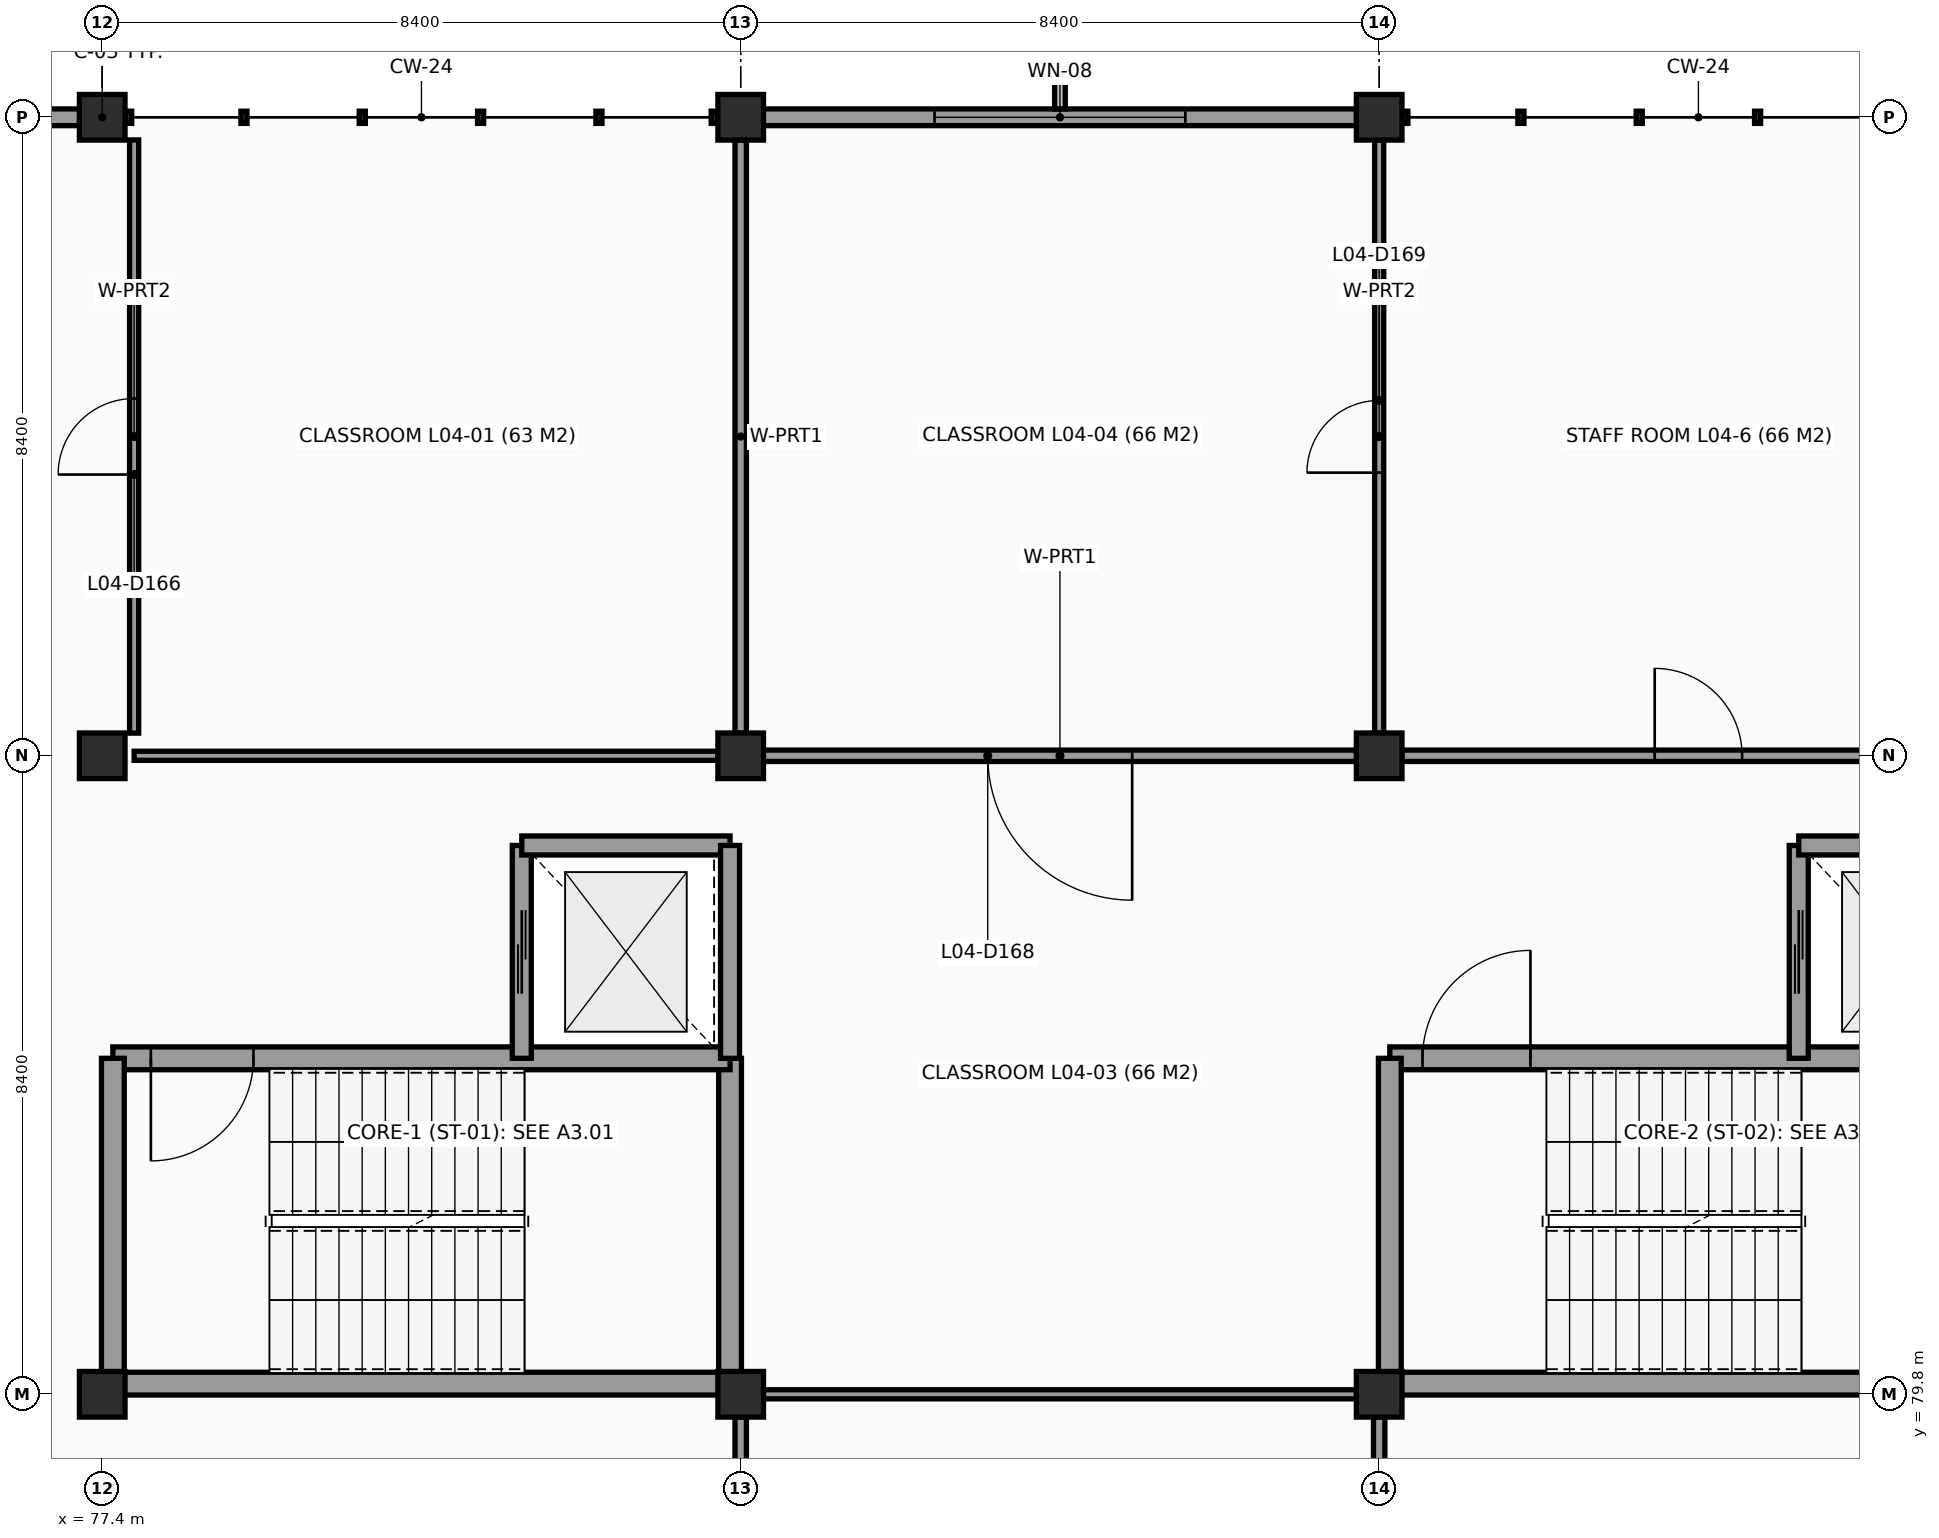
"""IFC4 building model, lengths in metres.
Left out: names, types, materials, properties, quantities, classifications, styles, units other than length and angle.
Written with IfcOpenShell. Run it as: python <this file> out.ifc"""

import sys

from ifc_helpers import new_model, si_unit, direction, frame, frame_2d, origin, origin_2d, place, context, subcontext, project, spatial, rectangle, extrude, element, fill, save


model = new_model("IFC4")
c1 = context("Model", 3, precision=1e-05, world=origin(), true_north=direction((0.0, 1.0)))
c2 = subcontext(c1, "Body", "Model", "MODEL_VIEW")
j1 = project(units=[si_unit("LENGTHUNIT", "METRE"), si_unit("PLANEANGLEUNIT", "RADIAN")], contexts=[c1])
p1 = place(None, origin())
s1 = spatial("IfcSite", under=j1, at=p1, CompositionType="ELEMENT")
p2 = place(p1, origin())
s2 = spatial("IfcBuilding", under=s1, at=p2, CompositionType="ELEMENT")
p3 = place(p2, frame((0.0, 0.0, 15.0)))
s3 = spatial("IfcBuildingStorey", under=s2, at=p3, CompositionType="ELEMENT", Elevation=15.0)
for number, where, z_axis, x_axis in (
    (1, (77.4, 79.8, 0.0), (0.0, 0.0, 1.0), (1.0, 0.0, 0.0)),
    (2, (77.4, 88.2, 0.0), (0.0, 0.0, 1.0), (1.0, 0.0, 0.0)),
    (3, (77.4, 96.6, 0.0), (0.0, 0.0, 1.0), (1.0, 0.0, 0.0)),
    (4, (85.8, 79.8, 0.0), (0.0, 0.0, 1.0), (1.0, 0.0, 0.0)),
    (5, (85.8, 88.2, 0.0), (0.0, 0.0, 1.0), (1.0, 0.0, 0.0)),
    (6, (85.8, 96.6, 0.0), (0.0, 0.0, 1.0), (1.0, 0.0, 0.0)),
    (7, (94.2, 79.8, 0.0), (0.0, 0.0, 1.0), (1.0, 0.0, 0.0)),
    (8, (94.2, 88.2, 0.0), (0.0, 0.0, 1.0), (1.0, 0.0, 0.0)),
    (9, (94.2, 96.6, 0.0), (0.0, 0.0, 1.0), (1.0, 0.0, 0.0)),
):
    element("IfcColumn", number, at=place(p3, frame(where, z_axis=z_axis, x_axis=x_axis)), inside=s3, PredefinedType="COLUMN", context=c2, shape_type="SweptSolid", body=[
        extrude(rectangle(XDim=0.6, YDim=0.6, at=origin_2d()), origin(), (0.0, 0.0, 1.0), 3.6),
    ])
p4 = place(p3, frame((74.623, 96.6, 0.0), z_axis=(0.0, 0.0, 1.0), x_axis=(1.0, 0.0, 0.0)))
e10 = element("IfcWall", 10, at=p4, inside=s3, PredefinedType="SOLIDWALL", context=c2, shape_type="SweptSolid", body=[
    extrude(rectangle(XDim=2.479, YDim=0.22, at=frame_2d((1.24, 0.0))), origin(), (0.0, 0.0, 1.0), 2.58),
])
p5 = place(p3, frame((86.098, 96.6, 0.0), z_axis=(0.0, 0.0, 1.0), x_axis=(1.0, 0.0, 0.0)))
e11 = element("IfcWall", 11, at=p5, inside=s3, PredefinedType="SOLIDWALL", context=c2, shape_type="SweptSolid", body=[
    extrude(rectangle(XDim=7.804, YDim=0.22, at=frame_2d((3.902, 0.0))), origin(), (0.0, 0.0, 1.0), 2.65),
])
p6 = place(p5, frame((2.252, 0.0, 0.95)))
e12 = element("IfcOpeningElement", 12, at=p6, cuts=e11, PredefinedType="OPENING", context=c2, shape_type="SweptSolid", body=[
    extrude(rectangle(XDim=3.3, YDim=1.2, at=frame_2d((1.65, 0.6))), frame((0.0, 0.12, 0.0), z_axis=(0.0, -1.0, 0.0), x_axis=(1.0, 0.0, 0.0)), (0.0, 0.0, 1.0), 0.24),
])
p7 = place(p3, frame((77.54, 79.94, 0.0), z_axis=(0.0, 0.0, 1.0), x_axis=(1.0, 0.0, 0.0)))
e13 = element("IfcWall", 13, at=p7, inside=s3, PredefinedType="SHEAR", context=c2, shape_type="SweptSolid", body=[
    extrude(rectangle(XDim=8.12, YDim=0.3, at=frame_2d((4.06, 0.0))), origin(), (0.0, 0.0, 1.0), 3.6),
])
p8 = place(p3, frame((85.66, 79.94, 0.0), z_axis=(0.0, 0.0, 1.0), x_axis=(0.0, 1.0, 0.0)))
e14 = element("IfcWall", 14, at=p8, inside=s3, PredefinedType="SHEAR", context=c2, shape_type="SweptSolid", body=[
    extrude(rectangle(XDim=4.28, YDim=0.3, at=frame_2d((2.14, 0.0))), origin(), (0.0, 0.0, 1.0), 3.6),
])
p9 = place(p3, frame((85.66, 84.22, 0.0), z_axis=(0.0, 0.0, 1.0), x_axis=(-1.0, 0.0, 0.0)))
e15 = element("IfcWall", 15, at=p9, inside=s3, PredefinedType="SHEAR", context=c2, shape_type="SweptSolid", body=[
    extrude(rectangle(XDim=8.12, YDim=0.3, at=frame_2d((4.06, 0.0))), origin(), (0.0, 0.0, 1.0), 3.6),
])
p10 = place(p9, frame((6.27, 0.0, 0.0)))
e16 = element("IfcOpeningElement", 16, at=p10, cuts=e15, PredefinedType="OPENING", context=c2, shape_type="SweptSolid", body=[
    extrude(rectangle(XDim=1.35, YDim=2.15, at=frame_2d((0.675, 1.075))), frame((0.0, 0.16, 0.0), z_axis=(0.0, -1.0, 0.0), x_axis=(1.0, 0.0, 0.0)), (0.0, 0.0, 1.0), 0.32),
])
p11 = place(p3, frame((77.54, 84.22, 0.0), z_axis=(0.0, 0.0, 1.0), x_axis=(0.0, -1.0, 0.0)))
e17 = element("IfcWall", 17, at=p11, inside=s3, PredefinedType="SHEAR", context=c2, shape_type="SweptSolid", body=[
    extrude(rectangle(XDim=4.28, YDim=0.3, at=frame_2d((2.14, 0.0))), origin(), (0.0, 0.0, 1.0), 3.6),
])
p12 = place(p3, frame((82.92, 87.02, 0.0), z_axis=(0.0, 0.0, 1.0), x_axis=(0.0, -1.0, 0.0)))
e18 = element("IfcWall", 18, at=p12, inside=s3, PredefinedType="SHEAR", context=c2, shape_type="SweptSolid", body=[
    extrude(rectangle(XDim=2.8, YDim=0.25, at=frame_2d((1.4, 0.0))), origin(), (0.0, 0.0, 1.0), 3.6),
])
p13 = place(p12, frame((0.85, 0.0, 0.0)))
e19 = element("IfcOpeningElement", 19, at=p13, cuts=e18, PredefinedType="OPENING", context=c2, shape_type="SweptSolid", body=[
    extrude(rectangle(XDim=1.1, YDim=2.15, at=frame_2d((0.55, 1.075))), frame((0.0, 0.135, 0.0), z_axis=(0.0, -1.0, 0.0), x_axis=(1.0, 0.0, 0.0)), (0.0, 0.0, 1.0), 0.27),
])
p14 = place(p3, frame((85.66, 87.02, 0.0), z_axis=(0.0, 0.0, 1.0), x_axis=(-1.0, 0.0, 0.0)))
e20 = element("IfcWall", 20, at=p14, inside=s3, PredefinedType="SHEAR", context=c2, shape_type="SweptSolid", body=[
    extrude(rectangle(XDim=2.74, YDim=0.25, at=frame_2d((1.37, 0.0))), origin(), (0.0, 0.0, 1.0), 3.6),
])
p15 = place(p3, frame((85.66, 84.22, 0.0), z_axis=(0.0, 0.0, 1.0), x_axis=(0.0, 1.0, 0.0)))
e21 = element("IfcWall", 21, at=p15, inside=s3, PredefinedType="SHEAR", context=c2, shape_type="SweptSolid", body=[
    extrude(rectangle(XDim=2.8, YDim=0.25, at=frame_2d((1.4, 0.0))), origin(), (0.0, 0.0, 1.0), 3.6),
])
p16 = place(p3, frame((94.34, 79.94, 0.0), z_axis=(0.0, 0.0, 1.0), x_axis=(1.0, 0.0, 0.0)))
e22 = element("IfcWall", 22, at=p16, inside=s3, PredefinedType="SHEAR", context=c2, shape_type="SweptSolid", body=[
    extrude(rectangle(XDim=8.12, YDim=0.3, at=frame_2d((4.06, 0.0))), origin(), (0.0, 0.0, 1.0), 3.6),
])
p17 = place(p3, frame((102.46, 84.22, 0.0), z_axis=(0.0, 0.0, 1.0), x_axis=(-1.0, 0.0, 0.0)))
e23 = element("IfcWall", 23, at=p17, inside=s3, PredefinedType="SHEAR", context=c2, shape_type="SweptSolid", body=[
    extrude(rectangle(XDim=8.12, YDim=0.3, at=frame_2d((4.06, 0.0))), origin(), (0.0, 0.0, 1.0), 3.6),
])
p18 = place(p17, frame((6.27, 0.0, 0.0)))
e24 = element("IfcOpeningElement", 24, at=p18, cuts=e23, PredefinedType="OPENING", context=c2, shape_type="SweptSolid", body=[
    extrude(rectangle(XDim=1.42, YDim=2.15, at=frame_2d((0.71, 1.075))), frame((0.0, 0.16, 0.0), z_axis=(0.0, -1.0, 0.0), x_axis=(1.0, 0.0, 0.0)), (0.0, 0.0, 1.0), 0.32),
])
p19 = place(p3, frame((94.34, 84.22, 0.0), z_axis=(0.0, 0.0, 1.0), x_axis=(0.0, -1.0, 0.0)))
e25 = element("IfcWall", 25, at=p19, inside=s3, PredefinedType="SHEAR", context=c2, shape_type="SweptSolid", body=[
    extrude(rectangle(XDim=4.28, YDim=0.3, at=frame_2d((2.14, 0.0))), origin(), (0.0, 0.0, 1.0), 3.6),
])
p20 = place(p3, frame((99.72, 87.02, 0.0), z_axis=(0.0, 0.0, 1.0), x_axis=(0.0, -1.0, 0.0)))
e26 = element("IfcWall", 26, at=p20, inside=s3, PredefinedType="SHEAR", context=c2, shape_type="SweptSolid", body=[
    extrude(rectangle(XDim=2.8, YDim=0.25, at=frame_2d((1.4, 0.0))), origin(), (0.0, 0.0, 1.0), 3.6),
])
p21 = place(p20, frame((0.85, 0.0, 0.0)))
e27 = element("IfcOpeningElement", 27, at=p21, cuts=e26, PredefinedType="OPENING", context=c2, shape_type="SweptSolid", body=[
    extrude(rectangle(XDim=1.1, YDim=2.15, at=frame_2d((0.55, 1.075))), frame((0.0, 0.135, 0.0), z_axis=(0.0, -1.0, 0.0), x_axis=(1.0, 0.0, 0.0)), (0.0, 0.0, 1.0), 0.27),
])
p22 = place(p3, frame((102.46, 87.02, 0.0), z_axis=(0.0, 0.0, 1.0), x_axis=(-1.0, 0.0, 0.0)))
e28 = element("IfcWall", 28, at=p22, inside=s3, PredefinedType="SHEAR", context=c2, shape_type="SweptSolid", body=[
    extrude(rectangle(XDim=2.74, YDim=0.25, at=frame_2d((1.37, 0.0))), origin(), (0.0, 0.0, 1.0), 3.6),
])
p23 = place(p3, frame((77.82, 88.498, 0.0), z_axis=(0.0, 0.0, 1.0), x_axis=(0.0, 1.0, 0.0)))
e29 = element("IfcWall", 29, at=p23, inside=s3, PredefinedType="PARTITIONING", context=c2, shape_type="SweptSolid", body=[
    extrude(rectangle(XDim=7.804, YDim=0.12, at=frame_2d((3.902, 0.0))), origin(), (0.0, 0.0, 1.0), 3.05),
])
p24 = place(p23, frame((3.402, 0.0, 0.0)))
e30 = element("IfcOpeningElement", 30, at=p24, cuts=e29, PredefinedType="OPENING", context=c2, shape_type="SweptSolid", body=[
    extrude(rectangle(XDim=1.0, YDim=2.1, at=frame_2d((0.5, 1.05))), frame((0.0, 0.07, 0.0), z_axis=(0.0, -1.0, 0.0), x_axis=(1.0, 0.0, 0.0)), (0.0, 0.0, 1.0), 0.14),
])
p25 = place(p3, frame((85.8, 96.302, 0.0), z_axis=(0.0, 0.0, 1.0), x_axis=(0.0, -1.0, 0.0)))
e31 = element("IfcWall", 31, at=p25, inside=s3, PredefinedType="PARTITIONING", context=c2, shape_type="SweptSolid", body=[
    extrude(rectangle(XDim=7.804, YDim=0.15, at=frame_2d((3.902, 0.0))), origin(), (0.0, 0.0, 1.0), 2.75),
])
p26 = place(p3, frame((85.502, 88.2, 0.0), z_axis=(0.0, 0.0, 1.0), x_axis=(-1.0, 0.0, 0.0)))
e32 = element("IfcWall", 32, at=p26, inside=s3, PredefinedType="PARTITIONING", context=c2, shape_type="SweptSolid", body=[
    extrude(rectangle(XDim=7.682, YDim=0.12, at=frame_2d((3.841, 0.0))), origin(), (0.0, 0.0, 1.0), 2.48),
])
p27 = place(p3, frame((85.8, 73.8, 0.0), z_axis=(0.0, 0.0, 1.0), x_axis=(0.0, 1.0, 0.0)))
e33 = element("IfcWall", 33, at=p27, inside=s3, PredefinedType="PARTITIONING", context=c2, shape_type="SweptSolid", body=[
    extrude(rectangle(XDim=5.702, YDim=0.15, at=frame_2d((2.851, 0.0))), origin(), (0.0, 0.0, 1.0), 2.68),
])
p28 = place(p27, frame((1.951, 0.0, 0.0)))
e34 = element("IfcOpeningElement", 34, at=p28, cuts=e33, PredefinedType="OPENING", context=c2, shape_type="SweptSolid", body=[
    extrude(rectangle(XDim=1.8, YDim=2.25, at=frame_2d((0.9, 1.125))), frame((0.0, 0.085, 0.0), z_axis=(0.0, -1.0, 0.0), x_axis=(1.0, 0.0, 0.0)), (0.0, 0.0, 1.0), 0.17),
])
p29 = place(p3, frame((86.098, 79.8, 0.0), z_axis=(0.0, 0.0, 1.0), x_axis=(1.0, 0.0, 0.0)))
e35 = element("IfcWall", 35, at=p29, inside=s3, PredefinedType="PARTITIONING", context=c2, shape_type="SweptSolid", body=[
    extrude(rectangle(XDim=7.804, YDim=0.12, at=frame_2d((3.902, 0.0))), origin(), (0.0, 0.0, 1.0), 2.7),
])
p30 = place(p3, frame((94.2, 79.502, 0.0), z_axis=(0.0, 0.0, 1.0), x_axis=(0.0, -1.0, 0.0)))
e36 = element("IfcWall", 36, at=p30, inside=s3, PredefinedType="PARTITIONING", context=c2, shape_type="SweptSolid", body=[
    extrude(rectangle(XDim=5.702, YDim=0.15, at=frame_2d((2.851, 0.0))), origin(), (0.0, 0.0, 1.0), 2.95),
])
p31 = place(p3, frame((86.098, 88.2, 0.0), z_axis=(0.0, 0.0, 1.0), x_axis=(1.0, 0.0, 0.0)))
e37 = element("IfcWall", 37, at=p31, inside=s3, PredefinedType="PARTITIONING", context=c2, shape_type="SweptSolid", body=[
    extrude(rectangle(XDim=7.804, YDim=0.15, at=frame_2d((3.902, 0.0))), origin(), (0.0, 0.0, 1.0), 2.55),
])
p32 = place(p31, frame((2.952, 0.0, 0.0)))
e38 = element("IfcOpeningElement", 38, at=p32, cuts=e37, PredefinedType="OPENING", context=c2, shape_type="SweptSolid", body=[
    extrude(rectangle(XDim=1.9, YDim=2.3, at=frame_2d((0.95, 1.15))), frame((0.0, 0.085, 0.0), z_axis=(0.0, -1.0, 0.0), x_axis=(1.0, 0.0, 0.0)), (0.0, 0.0, 1.0), 0.17),
])
p33 = place(p3, frame((94.2, 96.302, 0.0), z_axis=(0.0, 0.0, 1.0), x_axis=(0.0, -1.0, 0.0)))
e39 = element("IfcWall", 39, at=p33, inside=s3, PredefinedType="PARTITIONING", context=c2, shape_type="SweptSolid", body=[
    extrude(rectangle(XDim=7.804, YDim=0.12, at=frame_2d((3.902, 0.0))), origin(), (0.0, 0.0, 1.0), 2.95),
])
p34 = place(p33, frame((3.427, 0.0, 0.0)))
e40 = element("IfcOpeningElement", 40, at=p34, cuts=e39, PredefinedType="OPENING", context=c2, shape_type="SweptSolid", body=[
    extrude(rectangle(XDim=0.95, YDim=2.1, at=frame_2d((0.475, 1.05))), frame((0.0, 0.07, 0.0), z_axis=(0.0, -1.0, 0.0), x_axis=(1.0, 0.0, 0.0)), (0.0, 0.0, 1.0), 0.14),
])
p35 = place(p3, frame((102.302, 88.2, 0.0), z_axis=(0.0, 0.0, 1.0), x_axis=(-1.0, 0.0, 0.0)))
e41 = element("IfcWall", 41, at=p35, inside=s3, PredefinedType="PARTITIONING", context=c2, shape_type="SweptSolid", body=[
    extrude(rectangle(XDim=7.804, YDim=0.15, at=frame_2d((3.902, 0.0))), origin(), (0.0, 0.0, 1.0), 2.55),
])
p36 = place(p35, frame((3.327, 0.0, 0.0)))
e42 = element("IfcOpeningElement", 42, at=p36, cuts=e41, PredefinedType="OPENING", context=c2, shape_type="SweptSolid", body=[
    extrude(rectangle(XDim=1.15, YDim=2.15, at=frame_2d((0.575, 1.075))), frame((0.0, 0.085, 0.0), z_axis=(0.0, -1.0, 0.0), x_axis=(1.0, 0.0, 0.0)), (0.0, 0.0, 1.0), 0.17),
])
p37 = place(p6, origin())
e43 = element("IfcWindow", 43, at=p37, inside=s3, PartitioningType="SINGLE_PANEL", PredefinedType="WINDOW", context=c2, shape_type="SweptSolid", body=[
    extrude(rectangle(XDim=3.3, YDim=1.2, at=frame_2d((1.65, 0.6))), frame((0.0, 0.03, 0.0), z_axis=(0.0, -1.0, 0.0), x_axis=(1.0, 0.0, 0.0)), (0.0, 0.0, 1.0), 0.06),
])
fill(e12, e43)
p38 = place(p10, frame((1.35, 0.0, 0.0), z_axis=(0.0, 0.0, 1.0), x_axis=(-1.0, 0.0, 0.0)))
e44 = element("IfcDoor", 44, at=p38, inside=s3, OperationType="SINGLE_SWING_RIGHT", PredefinedType="DOOR", context=c2, shape_type="SweptSolid", body=[
    extrude(rectangle(XDim=1.35, YDim=2.15, at=frame_2d((0.675, 1.075))), frame((0.0, 0.025, 0.0), z_axis=(0.0, -1.0, 0.0), x_axis=(1.0, 0.0, 0.0)), (0.0, 0.0, 1.0), 0.05),
])
fill(e16, e44)
p39 = place(p13, origin())
e45 = element("IfcDoor", 45, at=p39, inside=s3, OperationType="DOUBLE_DOOR_SLIDING", PredefinedType="DOOR", context=c2, shape_type="SweptSolid", body=[
    extrude(rectangle(XDim=1.1, YDim=2.15, at=frame_2d((0.55, 1.075))), frame((0.0, 0.025, 0.0), z_axis=(0.0, -1.0, 0.0), x_axis=(1.0, 0.0, 0.0)), (0.0, 0.0, 1.0), 0.05),
])
fill(e19, e45)
p40 = place(p18, frame((1.42, 0.0, 0.0), z_axis=(0.0, 0.0, 1.0), x_axis=(-1.0, 0.0, 0.0)))
e46 = element("IfcDoor", 46, at=p40, inside=s3, OperationType="SINGLE_SWING_LEFT", PredefinedType="DOOR", context=c2, shape_type="SweptSolid", body=[
    extrude(rectangle(XDim=1.42, YDim=2.15, at=frame_2d((0.71, 1.075))), frame((0.0, 0.025, 0.0), z_axis=(0.0, -1.0, 0.0), x_axis=(1.0, 0.0, 0.0)), (0.0, 0.0, 1.0), 0.05),
])
fill(e24, e46)
p41 = place(p21, origin())
e47 = element("IfcDoor", 47, at=p41, inside=s3, OperationType="DOUBLE_DOOR_SLIDING", PredefinedType="DOOR", context=c2, shape_type="SweptSolid", body=[
    extrude(rectangle(XDim=1.1, YDim=2.15, at=frame_2d((0.55, 1.075))), frame((0.0, 0.025, 0.0), z_axis=(0.0, -1.0, 0.0), x_axis=(1.0, 0.0, 0.0)), (0.0, 0.0, 1.0), 0.05),
])
fill(e27, e47)
p42 = place(p24, origin())
e48 = element("IfcDoor", 48, at=p42, inside=s3, OperationType="SINGLE_SWING_LEFT", PredefinedType="DOOR", context=c2, shape_type="SweptSolid", body=[
    extrude(rectangle(XDim=1.0, YDim=2.1, at=frame_2d((0.5, 1.05))), frame((0.0, 0.025, 0.0), z_axis=(0.0, -1.0, 0.0), x_axis=(1.0, 0.0, 0.0)), (0.0, 0.0, 1.0), 0.05),
])
fill(e30, e48)
p43 = place(p32, origin())
e49 = element("IfcDoor", 49, at=p43, inside=s3, OperationType="DOUBLE_DOOR_SINGLE_SWING", PredefinedType="DOOR", context=c2, shape_type="SweptSolid", body=[
    extrude(rectangle(XDim=1.9, YDim=2.3, at=frame_2d((0.95, 1.15))), frame((0.0, 0.025, 0.0), z_axis=(0.0, -1.0, 0.0), x_axis=(1.0, 0.0, 0.0)), (0.0, 0.0, 1.0), 0.05),
])
fill(e38, e49)
p44 = place(p34, origin())
e50 = element("IfcDoor", 50, at=p44, inside=s3, OperationType="SINGLE_SWING_RIGHT", PredefinedType="DOOR", context=c2, shape_type="SweptSolid", body=[
    extrude(rectangle(XDim=0.95, YDim=2.1, at=frame_2d((0.475, 1.05))), frame((0.0, 0.025, 0.0), z_axis=(0.0, -1.0, 0.0), x_axis=(1.0, 0.0, 0.0)), (0.0, 0.0, 1.0), 0.05),
])
fill(e40, e50)
p45 = place(p36, origin())
e51 = element("IfcDoor", 51, at=p45, inside=s3, OperationType="SINGLE_SWING_RIGHT", PredefinedType="DOOR", context=c2, shape_type="SweptSolid", body=[
    extrude(rectangle(XDim=1.15, YDim=2.15, at=frame_2d((0.575, 1.075))), frame((0.0, 0.025, 0.0), z_axis=(0.0, -1.0, 0.0), x_axis=(1.0, 0.0, 0.0)), (0.0, 0.0, 1.0), 0.05),
])
fill(e42, e51)
save(model, sys.argv[1])
